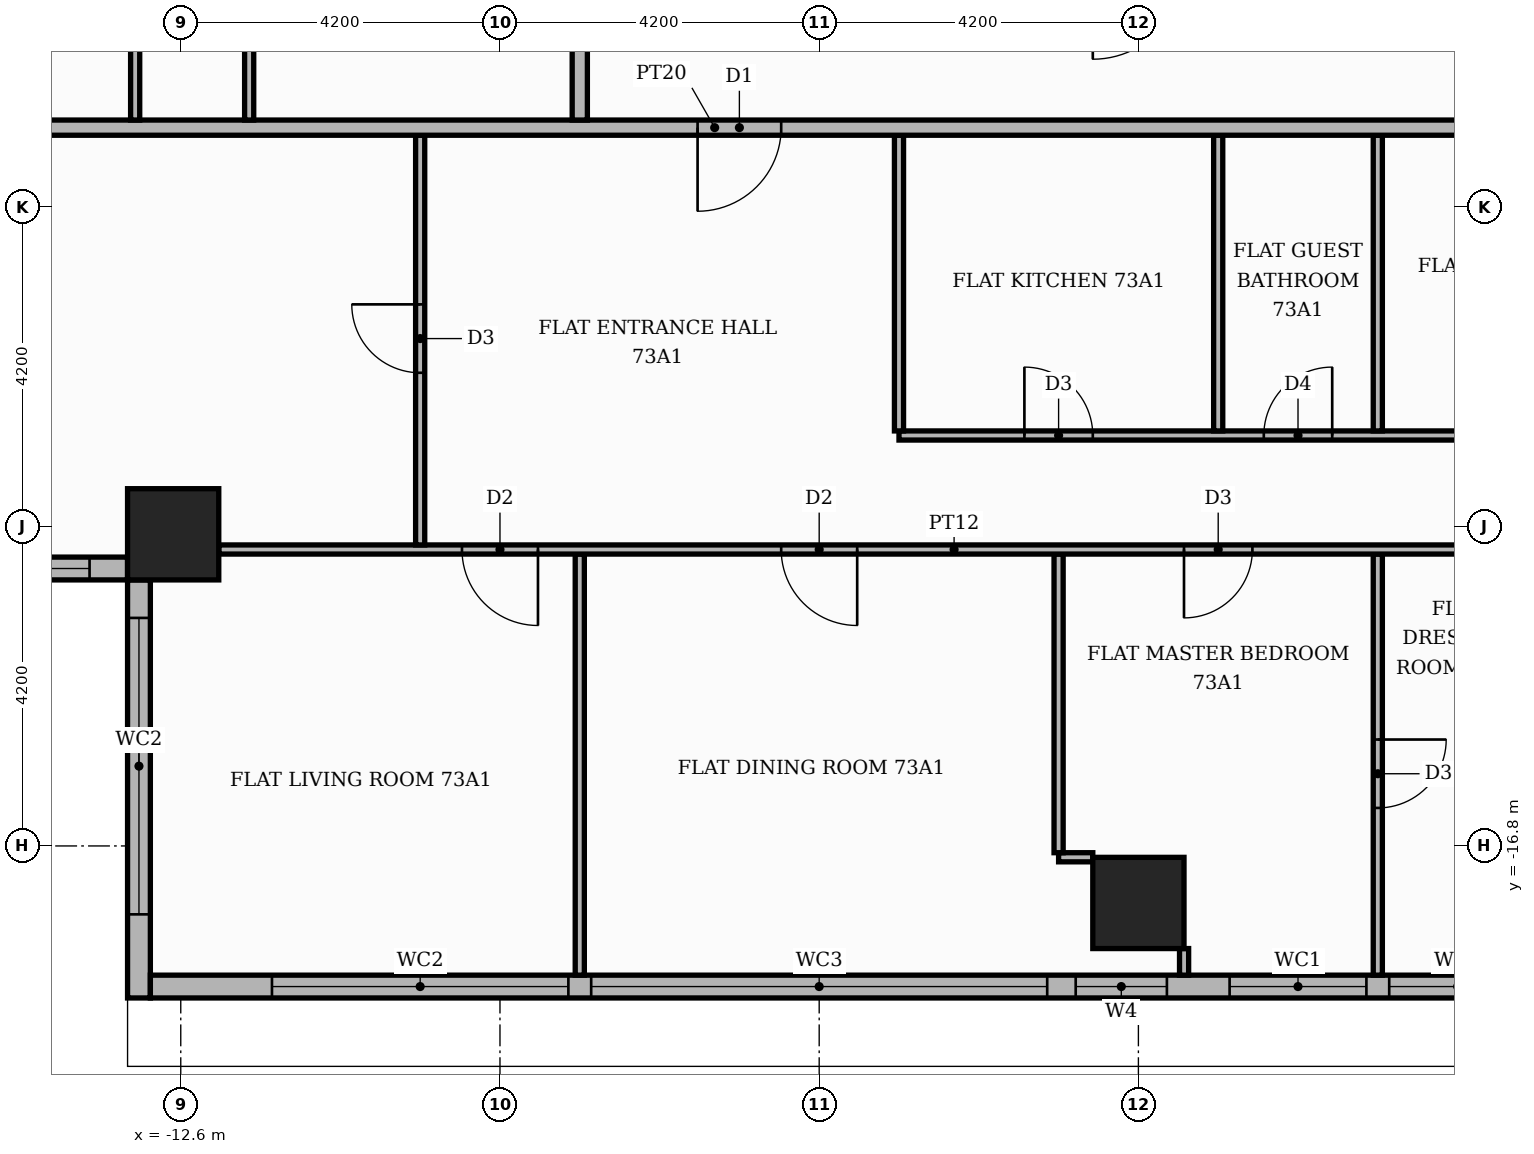
"""IFC4 building model, lengths in metres.
Left out: names, types, materials, properties, quantities, classifications, styles, units other than length and angle.
Written with IfcOpenShell. Run it as: python <this file> out.ifc"""

import sys

from ifc_helpers import new_model, si_unit, direction, frame, frame_2d, origin, origin_2d, place, context, subcontext, project, spatial, rectangle, extrude, element, fill, save


model = new_model("IFC4")
c1 = context("Model", 3, precision=1e-05, world=origin(), true_north=direction((0.0, 1.0)))
c2 = subcontext(c1, "Body", "Model", "MODEL_VIEW")
j1 = project(units=[si_unit("LENGTHUNIT", "METRE"), si_unit("PLANEANGLEUNIT", "RADIAN")], contexts=[c1])
p1 = place(None, origin())
s1 = spatial("IfcSite", under=j1, at=p1, CompositionType="ELEMENT")
p2 = place(p1, origin())
s2 = spatial("IfcBuilding", under=s1, at=p2, CompositionType="ELEMENT")
p3 = place(p2, frame((0.0, 0.0, 304.5)))
s3 = spatial("IfcBuildingStorey", under=s2, at=p3, CompositionType="ELEMENT", Elevation=304.5)
for number, where, z_axis, x_axis in (
    (1, (0.0, -17.55, 0.0), (0.0, 0.0, 1.0), (1.0, 0.0, 0.0)),
    (2, (-12.7, -12.7, 0.0), (0.0, 0.0, 1.0), (1.0, 0.0, 0.0)),
):
    element("IfcColumn", number, at=place(p3, frame(where, z_axis=z_axis, x_axis=x_axis)), inside=s3, PredefinedType="COLUMN", context=c2, shape_type="SweptSolid", body=[
        extrude(rectangle(XDim=1.2, YDim=1.2, at=origin_2d()), origin(), (0.0, 0.0, 1.0), 3.9),
    ])
p4 = place(p3, frame((-18.5, -13.15, 0.0), z_axis=(0.0, 0.0, 1.0), x_axis=(1.0, 0.0, 0.0)))
e3 = element("IfcWall", 3, at=p4, inside=s3, PredefinedType="STANDARD", context=c2, shape_type="SweptSolid", body=[
    extrude(rectangle(XDim=5.2, YDim=0.3, at=frame_2d((2.6, 0.0))), origin(), (0.0, 0.0, 1.0), 3.55),
])
p5 = place(p4, frame((0.8, 0.0, 0.6)))
e4 = element("IfcOpeningElement", 4, at=p5, cuts=e3, PredefinedType="OPENING", context=c2, shape_type="SweptSolid", body=[
    extrude(rectangle(XDim=3.9, YDim=2.4, at=frame_2d((1.95, 1.2))), frame((0.0, 0.16, 0.0), z_axis=(0.0, -1.0, 0.0), x_axis=(1.0, 0.0, 0.0)), (0.0, 0.0, 1.0), 0.32),
])
p6 = place(p3, frame((-13.15, -13.3, 0.0), z_axis=(0.0, 0.0, 1.0), x_axis=(0.0, -1.0, 0.0)))
e5 = element("IfcWall", 5, at=p6, inside=s3, PredefinedType="STANDARD", context=c2, shape_type="SweptSolid", body=[
    extrude(rectangle(XDim=5.5, YDim=0.3, at=frame_2d((2.75, 0.0))), origin(), (0.0, 0.0, 1.0), 3.55),
])
p7 = place(p6, frame((0.5, 0.0, 0.6)))
e6 = element("IfcOpeningElement", 6, at=p7, cuts=e5, PredefinedType="OPENING", context=c2, shape_type="SweptSolid", body=[
    extrude(rectangle(XDim=3.9, YDim=2.4, at=frame_2d((1.95, 1.2))), frame((0.0, 0.16, 0.0), z_axis=(0.0, -1.0, 0.0), x_axis=(1.0, 0.0, 0.0)), (0.0, 0.0, 1.0), 0.32),
])
p8 = place(p3, frame((-13.0, -18.65, 0.0), z_axis=(0.0, 0.0, 1.0), x_axis=(1.0, 0.0, 0.0)))
e7 = element("IfcWall", 7, at=p8, inside=s3, PredefinedType="STANDARD", context=c2, shape_type="SweptSolid", body=[
    extrude(rectangle(XDim=26.3, YDim=0.3, at=frame_2d((13.15, 0.0))), origin(), (0.0, 0.0, 1.0), 3.55),
])
p9 = place(p8, frame((1.6, 0.0, 0.6)))
e8 = element("IfcOpeningElement", 8, at=p9, cuts=e7, PredefinedType="OPENING", context=c2, shape_type="SweptSolid", body=[
    extrude(rectangle(XDim=3.9, YDim=2.4, at=frame_2d((1.95, 1.2))), frame((0.0, 0.16, 0.0), z_axis=(0.0, -1.0, 0.0), x_axis=(1.0, 0.0, 0.0)), (0.0, 0.0, 1.0), 0.32),
])
p10 = place(p8, frame((5.8, 0.0, 0.6)))
e9 = element("IfcOpeningElement", 9, at=p10, cuts=e7, PredefinedType="OPENING", context=c2, shape_type="SweptSolid", body=[
    extrude(rectangle(XDim=6.0, YDim=2.4, at=frame_2d((3.0, 1.2))), frame((0.0, 0.16, 0.0), z_axis=(0.0, -1.0, 0.0), x_axis=(1.0, 0.0, 0.0)), (0.0, 0.0, 1.0), 0.32),
])
p11 = place(p8, frame((14.2, 0.0, 0.6)))
e10 = element("IfcOpeningElement", 10, at=p11, cuts=e7, PredefinedType="OPENING", context=c2, shape_type="SweptSolid", body=[
    extrude(rectangle(XDim=1.8, YDim=2.4, at=frame_2d((0.9, 1.2))), frame((0.0, 0.16, 0.0), z_axis=(0.0, -1.0, 0.0), x_axis=(1.0, 0.0, 0.0)), (0.0, 0.0, 1.0), 0.32),
])
p12 = place(p8, frame((16.3, 0.0, 0.6)))
e11 = element("IfcOpeningElement", 11, at=p12, cuts=e7, PredefinedType="OPENING", context=c2, shape_type="SweptSolid", body=[
    extrude(rectangle(XDim=1.8, YDim=2.4, at=frame_2d((0.9, 1.2))), frame((0.0, 0.16, 0.0), z_axis=(0.0, -1.0, 0.0), x_axis=(1.0, 0.0, 0.0)), (0.0, 0.0, 1.0), 0.32),
])
p13 = place(p8, frame((18.4, 0.0, 0.6)))
e12 = element("IfcOpeningElement", 12, at=p13, cuts=e7, PredefinedType="OPENING", context=c2, shape_type="SweptSolid", body=[
    extrude(rectangle(XDim=1.8, YDim=2.4, at=frame_2d((0.9, 1.2))), frame((0.0, 0.16, 0.0), z_axis=(0.0, -1.0, 0.0), x_axis=(1.0, 0.0, 0.0)), (0.0, 0.0, 1.0), 0.32),
])
p14 = place(p8, frame((20.5, 0.0, 0.6)))
e13 = element("IfcOpeningElement", 13, at=p14, cuts=e7, PredefinedType="OPENING", context=c2, shape_type="SweptSolid", body=[
    extrude(rectangle(XDim=3.9, YDim=2.4, at=frame_2d((1.95, 1.2))), frame((0.0, 0.16, 0.0), z_axis=(0.0, -1.0, 0.0), x_axis=(1.0, 0.0, 0.0)), (0.0, 0.0, 1.0), 0.32),
])
p15 = place(p8, frame((12.175, 0.0, 0.9)))
e14 = element("IfcOpeningElement", 14, at=p15, cuts=e7, PredefinedType="OPENING", context=c2, shape_type="SweptSolid", body=[
    extrude(rectangle(XDim=1.2, YDim=2.1, at=frame_2d((0.6, 1.05))), frame((0.0, 0.16, 0.0), z_axis=(0.0, -1.0, 0.0), x_axis=(1.0, 0.0, 0.0)), (0.0, 0.0, 1.0), 0.32),
])
p16 = place(p3, frame((-7.35, -18.5, 0.0), z_axis=(0.0, 0.0, 1.0), x_axis=(0.0, 1.0, 0.0)))
e15 = element("IfcWall", 15, at=p16, inside=s3, PredefinedType="PARTITIONING", context=c2, shape_type="SweptSolid", body=[
    extrude(rectangle(XDim=5.54, YDim=0.12, at=frame_2d((2.77, 0.0))), origin(), (0.0, 0.0, 1.0), 3.55),
])
p17 = place(p3, frame((0.601, -18.5, 0.0), z_axis=(0.0, 0.0, 1.0), x_axis=(0.0, 1.0, 0.0)))
e16 = element("IfcWall", 16, at=p17, inside=s3, PredefinedType="PARTITIONING", context=c2, shape_type="SweptSolid", body=[
    extrude(rectangle(XDim=0.35, YDim=0.12, at=frame_2d((0.175, 0.0))), origin(), (0.0, 0.0, 1.0), 3.55),
])
p18 = place(p3, frame((3.15, -18.5, 0.0), z_axis=(0.0, 0.0, 1.0), x_axis=(0.0, 1.0, 0.0)))
e17 = element("IfcWall", 17, at=p18, inside=s3, PredefinedType="PARTITIONING", context=c2, shape_type="SweptSolid", body=[
    extrude(rectangle(XDim=5.54, YDim=0.12, at=frame_2d((2.77, 0.0))), origin(), (0.0, 0.0, 1.0), 3.55),
])
p19 = place(p18, frame((2.2, 0.0, 0.0)))
e18 = element("IfcOpeningElement", 18, at=p19, cuts=e17, PredefinedType="OPENING", context=c2, shape_type="SweptSolid", body=[
    extrude(rectangle(XDim=0.9, YDim=2.1, at=frame_2d((0.45, 1.05))), frame((0.0, 0.07, 0.0), z_axis=(0.0, -1.0, 0.0), x_axis=(1.0, 0.0, 0.0)), (0.0, 0.0, 1.0), 0.14),
])
p20 = place(p3, frame((-1.05, -16.949, 0.0), z_axis=(0.0, 0.0, 1.0), x_axis=(1.0, 0.0, 0.0)))
e19 = element("IfcWall", 19, at=p20, inside=s3, PredefinedType="PARTITIONING", context=c2, shape_type="SweptSolid", body=[
    extrude(rectangle(XDim=0.45, YDim=0.12, at=frame_2d((0.225, 0.0))), origin(), (0.0, 0.0, 1.0), 3.55),
])
p21 = place(p3, frame((-1.05, -16.889, 0.0), z_axis=(0.0, 0.0, 1.0), x_axis=(0.0, 1.0, 0.0)))
e20 = element("IfcWall", 20, at=p21, inside=s3, PredefinedType="PARTITIONING", context=c2, shape_type="SweptSolid", body=[
    extrude(rectangle(XDim=3.929, YDim=0.12, at=frame_2d((1.964, 0.0))), origin(), (0.0, 0.0, 1.0), 3.55),
])
p22 = place(p3, frame((-12.1, -12.9, 0.0), z_axis=(0.0, 0.0, 1.0), x_axis=(1.0, 0.0, 0.0)))
e21 = element("IfcWall", 21, at=p22, inside=s3, PredefinedType="PARTITIONING", context=c2, shape_type="SweptSolid", body=[
    extrude(rectangle(XDim=19.35, YDim=0.12, at=frame_2d((9.675, 0.0))), origin(), (0.0, 0.0, 1.0), 3.55),
])
p23 = place(p22, frame((3.2, 0.0, 0.0)))
e22 = element("IfcOpeningElement", 22, at=p23, cuts=e21, PredefinedType="OPENING", context=c2, shape_type="SweptSolid", body=[
    extrude(rectangle(XDim=1.0, YDim=2.1, at=frame_2d((0.5, 1.05))), frame((0.0, 0.07, 0.0), z_axis=(0.0, -1.0, 0.0), x_axis=(1.0, 0.0, 0.0)), (0.0, 0.0, 1.0), 0.14),
])
p24 = place(p22, frame((7.4, 0.0, 0.0)))
e23 = element("IfcOpeningElement", 23, at=p24, cuts=e21, PredefinedType="OPENING", context=c2, shape_type="SweptSolid", body=[
    extrude(rectangle(XDim=1.0, YDim=2.1, at=frame_2d((0.5, 1.05))), frame((0.0, 0.07, 0.0), z_axis=(0.0, -1.0, 0.0), x_axis=(1.0, 0.0, 0.0)), (0.0, 0.0, 1.0), 0.14),
])
p25 = place(p22, frame((12.7, 0.0, 0.0)))
e24 = element("IfcOpeningElement", 24, at=p25, cuts=e21, PredefinedType="OPENING", context=c2, shape_type="SweptSolid", body=[
    extrude(rectangle(XDim=0.9, YDim=2.1, at=frame_2d((0.45, 1.05))), frame((0.0, 0.07, 0.0), z_axis=(0.0, -1.0, 0.0), x_axis=(1.0, 0.0, 0.0)), (0.0, 0.0, 1.0), 0.14),
])
p26 = place(p3, frame((-9.45, -12.84, 0.0), z_axis=(0.0, 0.0, 1.0), x_axis=(0.0, 1.0, 0.0)))
e25 = element("IfcWall", 25, at=p26, inside=s3, PredefinedType="PARTITIONING", context=c2, shape_type="SweptSolid", body=[
    extrude(rectangle(XDim=5.39, YDim=0.12, at=frame_2d((2.695, 0.0))), origin(), (0.0, 0.0, 1.0), 3.55),
])
p27 = place(p26, frame((2.265, 0.0, 0.0)))
e26 = element("IfcOpeningElement", 26, at=p27, cuts=e25, PredefinedType="OPENING", context=c2, shape_type="SweptSolid", body=[
    extrude(rectangle(XDim=0.9, YDim=2.1, at=frame_2d((0.45, 1.05))), frame((0.0, 0.07, 0.0), z_axis=(0.0, -1.0, 0.0), x_axis=(1.0, 0.0, 0.0)), (0.0, 0.0, 1.0), 0.14),
])
p28 = place(p3, frame((-3.15, -11.4, 0.0), z_axis=(0.0, 0.0, 1.0), x_axis=(1.0, 0.0, 0.0)))
e27 = element("IfcWall", 27, at=p28, inside=s3, PredefinedType="PARTITIONING", context=c2, shape_type="SweptSolid", body=[
    extrude(rectangle(XDim=10.4, YDim=0.12, at=frame_2d((5.2, 0.0))), origin(), (0.0, 0.0, 1.0), 3.55),
])
p29 = place(p28, frame((1.65, 0.0, 0.0)))
e28 = element("IfcOpeningElement", 28, at=p29, cuts=e27, PredefinedType="OPENING", context=c2, shape_type="SweptSolid", body=[
    extrude(rectangle(XDim=0.9, YDim=2.1, at=frame_2d((0.45, 1.05))), frame((0.0, 0.07, 0.0), z_axis=(0.0, -1.0, 0.0), x_axis=(1.0, 0.0, 0.0)), (0.0, 0.0, 1.0), 0.14),
])
p30 = place(p28, frame((4.8, 0.0, 0.0)))
e29 = element("IfcOpeningElement", 29, at=p30, cuts=e27, PredefinedType="OPENING", context=c2, shape_type="SweptSolid", body=[
    extrude(rectangle(XDim=0.9, YDim=2.1, at=frame_2d((0.45, 1.05))), frame((0.0, 0.07, 0.0), z_axis=(0.0, -1.0, 0.0), x_axis=(1.0, 0.0, 0.0)), (0.0, 0.0, 1.0), 0.14),
])
p31 = place(p28, frame((7.95, 0.0, 0.0)))
e30 = element("IfcOpeningElement", 30, at=p31, cuts=e27, PredefinedType="OPENING", context=c2, shape_type="SweptSolid", body=[
    extrude(rectangle(XDim=0.9, YDim=2.1, at=frame_2d((0.45, 1.05))), frame((0.0, 0.07, 0.0), z_axis=(0.0, -1.0, 0.0), x_axis=(1.0, 0.0, 0.0)), (0.0, 0.0, 1.0), 0.14),
])
for number, where, z_axis, x_axis in (
    (31, (-3.15, -11.34, 0.0), (0.0, 0.0, 1.0), (0.0, 1.0, 0.0)),
    (32, (1.05, -11.34, 0.0), (0.0, 0.0, 1.0), (0.0, 1.0, 0.0)),
    (33, (3.15, -11.34, 0.0), (0.0, 0.0, 1.0), (0.0, 1.0, 0.0)),
):
    element("IfcWall", number, at=place(p3, frame(where, z_axis=z_axis, x_axis=x_axis)), inside=s3, PredefinedType="PARTITIONING", context=c2, shape_type="SweptSolid", body=[
        extrude(rectangle(XDim=3.89, YDim=0.12, at=frame_2d((1.945, 0.0))), origin(), (0.0, 0.0, 1.0), 3.55),
    ])
p32 = place(p3, frame((-18.5, -7.35, 0.0), z_axis=(0.0, 0.0, 1.0), x_axis=(1.0, 0.0, 0.0)))
e34 = element("IfcWall", 34, at=p32, inside=s3, PredefinedType="PARTITIONING", context=c2, shape_type="SweptSolid", body=[
    extrude(rectangle(XDim=25.85, YDim=0.2, at=frame_2d((12.925, 0.0))), origin(), (0.0, 0.0, 1.0), 3.55),
])
p33 = place(p32, frame((12.7, 0.0, 0.0)))
e35 = element("IfcOpeningElement", 35, at=p33, cuts=e34, PredefinedType="OPENING", context=c2, shape_type="SweptSolid", body=[
    extrude(rectangle(XDim=1.1, YDim=2.4, at=frame_2d((0.55, 1.2))), frame((0.0, 0.11, 0.0), z_axis=(0.0, -1.0, 0.0), x_axis=(1.0, 0.0, 0.0)), (0.0, 0.0, 1.0), 0.22),
])
p34 = place(p3, frame((-13.2, -7.25, 0.0), z_axis=(0.0, 0.0, 1.0), x_axis=(0.0, 1.0, 0.0)))
e36 = element("IfcWall", 36, at=p34, inside=s3, PredefinedType="PARTITIONING", context=c2, shape_type="SweptSolid", body=[
    extrude(rectangle(XDim=1.94, YDim=0.12, at=frame_2d((0.97, 0.0))), origin(), (0.0, 0.0, 1.0), 3.55),
])
p35 = place(p3, frame((-11.7, -7.25, 0.0), z_axis=(0.0, 0.0, 1.0), x_axis=(0.0, 1.0, 0.0)))
e37 = element("IfcWall", 37, at=p35, inside=s3, PredefinedType="PARTITIONING", context=c2, shape_type="SweptSolid", body=[
    extrude(rectangle(XDim=3.44, YDim=0.12, at=frame_2d((1.72, 0.0))), origin(), (0.0, 0.0, 1.0), 3.55),
])
p36 = place(p35, frame((1.25, 0.0, 0.0)))
e38 = element("IfcOpeningElement", 38, at=p36, cuts=e37, PredefinedType="OPENING", context=c2, shape_type="SweptSolid", body=[
    extrude(rectangle(XDim=0.9, YDim=2.1, at=frame_2d((0.45, 1.05))), frame((0.0, 0.07, 0.0), z_axis=(0.0, -1.0, 0.0), x_axis=(1.0, 0.0, 0.0)), (0.0, 0.0, 1.0), 0.14),
])
p37 = place(p3, frame((-7.35, -7.25, 0.0), z_axis=(0.0, 0.0, 1.0), x_axis=(0.0, 1.0, 0.0)))
e39 = element("IfcWall", 39, at=p37, inside=s3, PredefinedType="PARTITIONING", context=c2, shape_type="SweptSolid", body=[
    extrude(rectangle(XDim=14.5, YDim=0.2, at=frame_2d((7.25, 0.0))), origin(), (0.0, 0.0, 1.0), 3.55),
])
p38 = place(p37, frame((10.9, 0.0, 0.0)))
e40 = element("IfcOpeningElement", 40, at=p38, cuts=e39, PredefinedType="OPENING", context=c2, shape_type="SweptSolid", body=[
    extrude(rectangle(XDim=1.1, YDim=2.4, at=frame_2d((0.55, 1.2))), frame((0.0, 0.11, 0.0), z_axis=(0.0, -1.0, 0.0), x_axis=(1.0, 0.0, 0.0)), (0.0, 0.0, 1.0), 0.22),
])
p39 = place(p5, origin())
e41 = element("IfcWindow", 41, at=p39, inside=s3, PartitioningType="SINGLE_PANEL", PredefinedType="WINDOW", context=c2, shape_type="SweptSolid", body=[
    extrude(rectangle(XDim=3.9, YDim=2.4, at=frame_2d((1.95, 1.2))), frame((0.0, 0.03, 0.0), z_axis=(0.0, -1.0, 0.0), x_axis=(1.0, 0.0, 0.0)), (0.0, 0.0, 1.0), 0.06),
])
fill(e4, e41)
p40 = place(p7, origin())
e42 = element("IfcWindow", 42, at=p40, inside=s3, PartitioningType="SINGLE_PANEL", PredefinedType="WINDOW", context=c2, shape_type="SweptSolid", body=[
    extrude(rectangle(XDim=3.9, YDim=2.4, at=frame_2d((1.95, 1.2))), frame((0.0, 0.03, 0.0), z_axis=(0.0, -1.0, 0.0), x_axis=(1.0, 0.0, 0.0)), (0.0, 0.0, 1.0), 0.06),
])
fill(e6, e42)
p41 = place(p9, origin())
e43 = element("IfcWindow", 43, at=p41, inside=s3, PartitioningType="SINGLE_PANEL", PredefinedType="WINDOW", context=c2, shape_type="SweptSolid", body=[
    extrude(rectangle(XDim=3.9, YDim=2.4, at=frame_2d((1.95, 1.2))), frame((0.0, 0.03, 0.0), z_axis=(0.0, -1.0, 0.0), x_axis=(1.0, 0.0, 0.0)), (0.0, 0.0, 1.0), 0.06),
])
fill(e8, e43)
p42 = place(p10, origin())
e44 = element("IfcWindow", 44, at=p42, inside=s3, PartitioningType="SINGLE_PANEL", PredefinedType="WINDOW", context=c2, shape_type="SweptSolid", body=[
    extrude(rectangle(XDim=6.0, YDim=2.4, at=frame_2d((3.0, 1.2))), frame((0.0, 0.03, 0.0), z_axis=(0.0, -1.0, 0.0), x_axis=(1.0, 0.0, 0.0)), (0.0, 0.0, 1.0), 0.06),
])
fill(e9, e44)
p43 = place(p11, origin())
e45 = element("IfcWindow", 45, at=p43, inside=s3, PartitioningType="SINGLE_PANEL", PredefinedType="WINDOW", context=c2, shape_type="SweptSolid", body=[
    extrude(rectangle(XDim=1.8, YDim=2.4, at=frame_2d((0.9, 1.2))), frame((0.0, 0.03, 0.0), z_axis=(0.0, -1.0, 0.0), x_axis=(1.0, 0.0, 0.0)), (0.0, 0.0, 1.0), 0.06),
])
fill(e10, e45)
p44 = place(p12, origin())
e46 = element("IfcWindow", 46, at=p44, inside=s3, PartitioningType="SINGLE_PANEL", PredefinedType="WINDOW", context=c2, shape_type="SweptSolid", body=[
    extrude(rectangle(XDim=1.8, YDim=2.4, at=frame_2d((0.9, 1.2))), frame((0.0, 0.03, 0.0), z_axis=(0.0, -1.0, 0.0), x_axis=(1.0, 0.0, 0.0)), (0.0, 0.0, 1.0), 0.06),
])
fill(e11, e46)
p45 = place(p15, origin())
e47 = element("IfcWindow", 47, at=p45, inside=s3, PartitioningType="SINGLE_PANEL", PredefinedType="WINDOW", context=c2, shape_type="SweptSolid", body=[
    extrude(rectangle(XDim=1.2, YDim=2.1, at=frame_2d((0.6, 1.05))), frame((0.0, 0.03, 0.0), z_axis=(0.0, -1.0, 0.0), x_axis=(1.0, 0.0, 0.0)), (0.0, 0.0, 1.0), 0.06),
])
fill(e14, e47)
p46 = place(p33, frame((1.1, 0.0, 0.0), z_axis=(0.0, 0.0, 1.0), x_axis=(-1.0, 0.0, 0.0)))
e48 = element("IfcDoor", 48, at=p46, inside=s3, OperationType="SINGLE_SWING_LEFT", PredefinedType="DOOR", context=c2, shape_type="SweptSolid", body=[
    extrude(rectangle(XDim=1.1, YDim=2.4, at=frame_2d((0.55, 1.2))), frame((0.0, 0.025, 0.0), z_axis=(0.0, -1.0, 0.0), x_axis=(1.0, 0.0, 0.0)), (0.0, 0.0, 1.0), 0.05),
])
fill(e35, e48)
p47 = place(p27, origin())
e49 = element("IfcDoor", 49, at=p47, inside=s3, OperationType="SINGLE_SWING_RIGHT", PredefinedType="DOOR", context=c2, shape_type="SweptSolid", body=[
    extrude(rectangle(XDim=0.9, YDim=2.1, at=frame_2d((0.45, 1.05))), frame((0.0, 0.025, 0.0), z_axis=(0.0, -1.0, 0.0), x_axis=(1.0, 0.0, 0.0)), (0.0, 0.0, 1.0), 0.05),
])
fill(e26, e49)
p48 = place(p29, origin())
e50 = element("IfcDoor", 50, at=p48, inside=s3, OperationType="SINGLE_SWING_LEFT", PredefinedType="DOOR", context=c2, shape_type="SweptSolid", body=[
    extrude(rectangle(XDim=0.9, YDim=2.1, at=frame_2d((0.45, 1.05))), frame((0.0, 0.025, 0.0), z_axis=(0.0, -1.0, 0.0), x_axis=(1.0, 0.0, 0.0)), (0.0, 0.0, 1.0), 0.05),
])
fill(e28, e50)
p49 = place(p30, origin())
e51 = element("IfcDoor", 51, at=p49, inside=s3, OperationType="SINGLE_SWING_RIGHT", PredefinedType="DOOR", context=c2, shape_type="SweptSolid", body=[
    extrude(rectangle(XDim=0.9, YDim=2.1, at=frame_2d((0.45, 1.05))), frame((0.0, 0.025, 0.0), z_axis=(0.0, -1.0, 0.0), x_axis=(1.0, 0.0, 0.0)), (0.0, 0.0, 1.0), 0.05),
])
fill(e29, e51)
p50 = place(p23, frame((1.0, 0.0, 0.0), z_axis=(0.0, 0.0, 1.0), x_axis=(-1.0, 0.0, 0.0)))
e52 = element("IfcDoor", 52, at=p50, inside=s3, OperationType="SINGLE_SWING_RIGHT", PredefinedType="DOOR", context=c2, shape_type="SweptSolid", body=[
    extrude(rectangle(XDim=1.0, YDim=2.1, at=frame_2d((0.5, 1.05))), frame((0.0, 0.025, 0.0), z_axis=(0.0, -1.0, 0.0), x_axis=(1.0, 0.0, 0.0)), (0.0, 0.0, 1.0), 0.05),
])
fill(e22, e52)
p51 = place(p24, frame((1.0, 0.0, 0.0), z_axis=(0.0, 0.0, 1.0), x_axis=(-1.0, 0.0, 0.0)))
e53 = element("IfcDoor", 53, at=p51, inside=s3, OperationType="SINGLE_SWING_RIGHT", PredefinedType="DOOR", context=c2, shape_type="SweptSolid", body=[
    extrude(rectangle(XDim=1.0, YDim=2.1, at=frame_2d((0.5, 1.05))), frame((0.0, 0.025, 0.0), z_axis=(0.0, -1.0, 0.0), x_axis=(1.0, 0.0, 0.0)), (0.0, 0.0, 1.0), 0.05),
])
fill(e23, e53)
p52 = place(p25, frame((0.9, 0.0, 0.0), z_axis=(0.0, 0.0, 1.0), x_axis=(-1.0, 0.0, 0.0)))
e54 = element("IfcDoor", 54, at=p52, inside=s3, OperationType="SINGLE_SWING_LEFT", PredefinedType="DOOR", context=c2, shape_type="SweptSolid", body=[
    extrude(rectangle(XDim=0.9, YDim=2.1, at=frame_2d((0.45, 1.05))), frame((0.0, 0.025, 0.0), z_axis=(0.0, -1.0, 0.0), x_axis=(1.0, 0.0, 0.0)), (0.0, 0.0, 1.0), 0.05),
])
fill(e24, e54)
p53 = place(p19, frame((0.9, 0.0, 0.0), z_axis=(0.0, 0.0, 1.0), x_axis=(-1.0, 0.0, 0.0)))
e55 = element("IfcDoor", 55, at=p53, inside=s3, OperationType="SINGLE_SWING_RIGHT", PredefinedType="DOOR", context=c2, shape_type="SweptSolid", body=[
    extrude(rectangle(XDim=0.9, YDim=2.1, at=frame_2d((0.45, 1.05))), frame((0.0, 0.025, 0.0), z_axis=(0.0, -1.0, 0.0), x_axis=(1.0, 0.0, 0.0)), (0.0, 0.0, 1.0), 0.05),
])
fill(e18, e55)
save(model, sys.argv[1])
